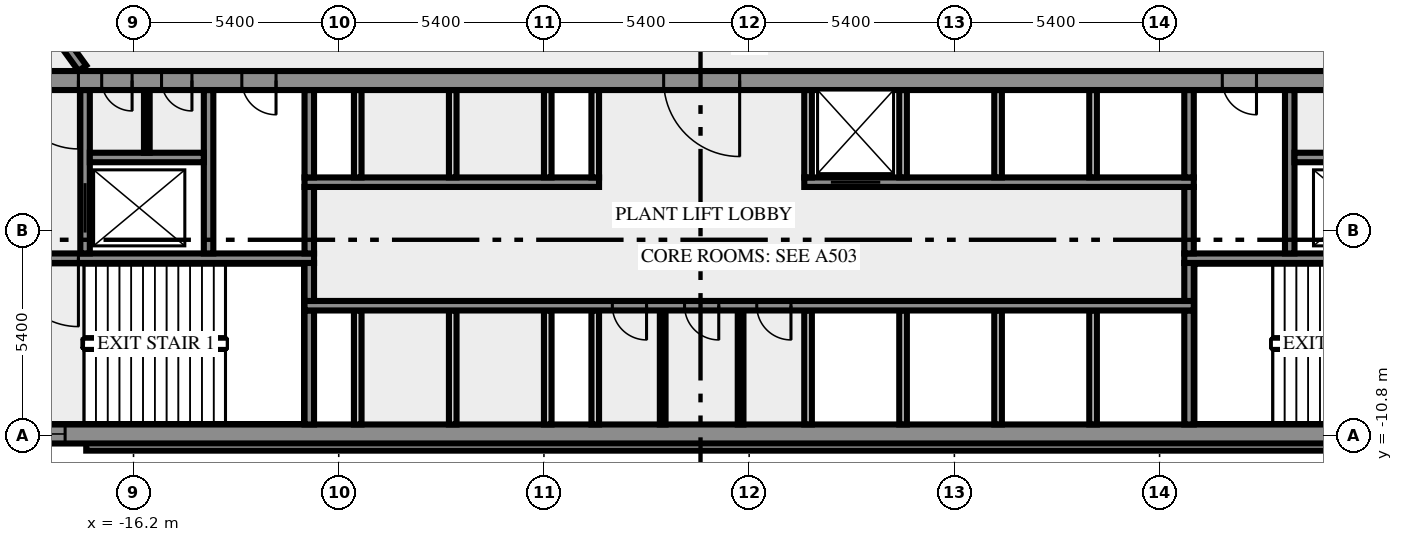
"""IFC4 building model, lengths in metres.
Left out: names, types, materials, properties, quantities, classifications, styles, units other than length and angle.
Written with IfcOpenShell. Run it as: python <this file> out.ifc"""

import sys

from ifc_helpers import new_model, si_unit, direction, frame, frame_2d, origin, place, context, subcontext, project, spatial, rectangle, extrude, element, fill, save


model = new_model("IFC4")
c1 = context("Model", 3, precision=1e-05, world=origin(), true_north=direction((0.0, 1.0)))
c2 = subcontext(c1, "Body", "Model", "MODEL_VIEW")
j1 = project(units=[si_unit("LENGTHUNIT", "METRE"), si_unit("PLANEANGLEUNIT", "RADIAN")], contexts=[c1])
p1 = place(None, origin())
s1 = spatial("IfcSite", under=j1, at=p1, CompositionType="ELEMENT")
p2 = place(p1, origin())
s2 = spatial("IfcBuilding", under=s1, at=p2, CompositionType="ELEMENT")
p3 = place(p2, frame((0.0, 0.0, 242.0)))
s3 = spatial("IfcBuildingStorey", under=s2, at=p3, CompositionType="ELEMENT", Elevation=242.0)
p4 = place(p3, frame((-17.444, -11.088, 0.0), z_axis=(0.0, 0.0, 1.0), x_axis=(1.0, 0.0, 0.0)))
e1 = element("IfcWall", 1, at=p4, inside=s3, PredefinedType="SOLIDWALL", context=c2, shape_type="SweptSolid", body=[
    extrude(rectangle(XDim=34.888, YDim=0.2, at=frame_2d((17.444, 0.0))), origin(), (0.0, 0.0, 1.0), 5.6),
])
p5 = place(p3, frame((-20.0, -10.75, 0.0), z_axis=(0.0, 0.0, 1.0), x_axis=(1.0, 0.0, 0.0)))
e2 = element("IfcWall", 2, at=p5, inside=s3, PredefinedType="SHEAR", context=c2, shape_type="SweptSolid", body=[
    extrude(rectangle(XDim=40.0, YDim=0.5, at=frame_2d((20.0, 0.0))), origin(), (0.0, 0.0, 1.0), 5.6),
])
p6 = place(p5, frame((0.8, 0.0, 1.0)))
e3 = element("IfcOpeningElement", 3, at=p6, cuts=e2, PredefinedType="OPENING", context=c2, shape_type="SweptSolid", body=[
    extrude(rectangle(XDim=1.2, YDim=1.2, at=frame_2d((0.6, 0.6))), frame((0.0, 0.26, 0.0), z_axis=(0.0, -1.0, 0.0), x_axis=(1.0, 0.0, 0.0)), (0.0, 0.0, 1.0), 0.52),
])
p7 = place(p5, frame((38.0, 0.0, 1.0)))
e4 = element("IfcOpeningElement", 4, at=p7, cuts=e2, PredefinedType="OPENING", context=c2, shape_type="SweptSolid", body=[
    extrude(rectangle(XDim=1.2, YDim=1.2, at=frame_2d((0.6, 0.6))), frame((0.0, 0.26, 0.0), z_axis=(0.0, -1.0, 0.0), x_axis=(1.0, 0.0, 0.0)), (0.0, 0.0, 1.0), 0.52),
])
p8 = place(p3, frame((-11.575, -10.5, 0.0), z_axis=(0.0, 0.0, 1.0), x_axis=(0.0, 1.0, 0.0)))
e5 = element("IfcWall", 5, at=p8, inside=s3, PredefinedType="SHEAR", context=c2, shape_type="SweptSolid", body=[
    extrude(rectangle(XDim=3.0, YDim=0.25, at=frame_2d((1.5, 0.0))), origin(), (0.0, 0.0, 1.0), 5.6),
])
for number, where, z_axis, x_axis in (
    (6, (-10.3, -10.5, 0.0), (0.0, 0.0, 1.0), (0.0, 1.0, 0.0)),
    (7, (-7.8, -10.5, 0.0), (0.0, 0.0, 1.0), (0.0, 1.0, 0.0)),
    (8, (-5.3, -10.5, 0.0), (0.0, 0.0, 1.0), (0.0, 1.0, 0.0)),
    (9, (-4.05, -10.5, 0.0), (0.0, 0.0, 1.0), (0.0, 1.0, 0.0)),
):
    element("IfcWall", number, at=place(p3, frame(where, z_axis=z_axis, x_axis=x_axis)), inside=s3, PredefinedType="SOLIDWALL", context=c2, shape_type="SweptSolid", body=[
        extrude(rectangle(XDim=3.0, YDim=0.2, at=frame_2d((1.5, 0.0))), origin(), (0.0, 0.0, 1.0), 5.6),
    ])
for number, where, z_axis, x_axis in (
    (10, (-2.275, -10.5, 0.0), (0.0, 0.0, 1.0), (0.0, 1.0, 0.0)),
    (11, (-0.225, -10.5, 0.0), (0.0, 0.0, 1.0), (0.0, 1.0, 0.0)),
):
    element("IfcWall", number, at=place(p3, frame(where, z_axis=z_axis, x_axis=x_axis)), inside=s3, PredefinedType="PARTITIONING", context=c2, shape_type="SweptSolid", body=[
        extrude(rectangle(XDim=3.0, YDim=0.15, at=frame_2d((1.5, 0.0))), origin(), (0.0, 0.0, 1.0), 5.6),
    ])
for number, where, z_axis, x_axis in (
    (12, (1.55, -10.5, 0.0), (0.0, 0.0, 1.0), (0.0, 1.0, 0.0)),
    (13, (4.05, -10.5, 0.0), (0.0, 0.0, 1.0), (0.0, 1.0, 0.0)),
    (14, (6.55, -10.5, 0.0), (0.0, 0.0, 1.0), (0.0, 1.0, 0.0)),
    (15, (9.05, -10.5, 0.0), (0.0, 0.0, 1.0), (0.0, 1.0, 0.0)),
):
    element("IfcWall", number, at=place(p3, frame(where, z_axis=z_axis, x_axis=x_axis)), inside=s3, PredefinedType="SOLIDWALL", context=c2, shape_type="SweptSolid", body=[
        extrude(rectangle(XDim=3.0, YDim=0.2, at=frame_2d((1.5, 0.0))), origin(), (0.0, 0.0, 1.0), 5.6),
    ])
p9 = place(p3, frame((11.575, -10.5, 0.0), z_axis=(0.0, 0.0, 1.0), x_axis=(0.0, 1.0, 0.0)))
e16 = element("IfcWall", 16, at=p9, inside=s3, PredefinedType="SHEAR", context=c2, shape_type="SweptSolid", body=[
    extrude(rectangle(XDim=3.0, YDim=0.25, at=frame_2d((1.5, 0.0))), origin(), (0.0, 0.0, 1.0), 5.6),
])
p10 = place(p3, frame((11.7, -7.375, 0.0), z_axis=(0.0, 0.0, 1.0), x_axis=(-1.0, 0.0, 0.0)))
e17 = element("IfcWall", 17, at=p10, inside=s3, PredefinedType="SHEAR", context=c2, shape_type="SweptSolid", body=[
    extrude(rectangle(XDim=23.4, YDim=0.25, at=frame_2d((11.7, 0.0))), origin(), (0.0, 0.0, 1.0), 5.6),
])
p11 = place(p10, frame((14.4, 0.0, 0.0)))
e18 = element("IfcOpeningElement", 18, at=p11, cuts=e17, PredefinedType="OPENING", context=c2, shape_type="SweptSolid", body=[
    extrude(rectangle(XDim=0.9, YDim=2.1, at=frame_2d((0.45, 1.05))), frame((0.0, 0.135, 0.0), z_axis=(0.0, -1.0, 0.0), x_axis=(1.0, 0.0, 0.0)), (0.0, 0.0, 1.0), 0.27),
])
p12 = place(p10, frame((12.5, 0.0, 0.0)))
e19 = element("IfcOpeningElement", 19, at=p12, cuts=e17, PredefinedType="OPENING", context=c2, shape_type="SweptSolid", body=[
    extrude(rectangle(XDim=0.9, YDim=2.1, at=frame_2d((0.45, 1.05))), frame((0.0, 0.135, 0.0), z_axis=(0.0, -1.0, 0.0), x_axis=(1.0, 0.0, 0.0)), (0.0, 0.0, 1.0), 0.27),
])
p13 = place(p10, frame((10.6, 0.0, 0.0)))
e20 = element("IfcOpeningElement", 20, at=p13, cuts=e17, PredefinedType="OPENING", context=c2, shape_type="SweptSolid", body=[
    extrude(rectangle(XDim=0.9, YDim=2.1, at=frame_2d((0.45, 1.05))), frame((0.0, 0.135, 0.0), z_axis=(0.0, -1.0, 0.0), x_axis=(1.0, 0.0, 0.0)), (0.0, 0.0, 1.0), 0.27),
])
for number, where, z_axis, x_axis in (
    (21, (-11.575, -7.25, 0.0), (0.0, 0.0, 1.0), (0.0, 1.0, 0.0)),
    (22, (11.575, -7.25, 0.0), (0.0, 0.0, 1.0), (0.0, 1.0, 0.0)),
):
    element("IfcWall", number, at=place(p3, frame(where, z_axis=z_axis, x_axis=x_axis)), inside=s3, PredefinedType="SHEAR", context=c2, shape_type="SweptSolid", body=[
        extrude(rectangle(XDim=1.0, YDim=0.25, at=frame_2d((0.5, 0.0))), origin(), (0.0, 0.0, 1.0), 5.6),
    ])
p14 = place(p3, frame((-11.45, -6.125, 0.0), z_axis=(0.0, 0.0, 1.0), x_axis=(-1.0, 0.0, 0.0)))
e23 = element("IfcWall", 23, at=p14, inside=s3, PredefinedType="SHEAR", context=c2, shape_type="SweptSolid", body=[
    extrude(rectangle(XDim=8.05, YDim=0.25, at=frame_2d((4.025, 0.0))), origin(), (0.0, 0.0, 1.0), 5.6),
])
p15 = place(p14, frame((6.2, 0.0, 0.0)))
e24 = element("IfcOpeningElement", 24, at=p15, cuts=e23, PredefinedType="OPENING", context=c2, shape_type="SweptSolid", body=[
    extrude(rectangle(XDim=1.8, YDim=2.1, at=frame_2d((0.9, 1.05))), frame((0.0, 0.135, 0.0), z_axis=(0.0, -1.0, 0.0), x_axis=(1.0, 0.0, 0.0)), (0.0, 0.0, 1.0), 0.27),
])
p16 = place(p3, frame((19.5, -6.125, 0.0), z_axis=(0.0, 0.0, 1.0), x_axis=(-1.0, 0.0, 0.0)))
e25 = element("IfcWall", 25, at=p16, inside=s3, PredefinedType="SHEAR", context=c2, shape_type="SweptSolid", body=[
    extrude(rectangle(XDim=8.05, YDim=0.25, at=frame_2d((4.025, 0.0))), origin(), (0.0, 0.0, 1.0), 5.6),
])
p17 = place(p16, frame((0.05, 0.0, 0.0)))
e26 = element("IfcOpeningElement", 26, at=p17, cuts=e25, PredefinedType="OPENING", context=c2, shape_type="SweptSolid", body=[
    extrude(rectangle(XDim=1.8, YDim=2.1, at=frame_2d((0.9, 1.05))), frame((0.0, 0.135, 0.0), z_axis=(0.0, -1.0, 0.0), x_axis=(1.0, 0.0, 0.0)), (0.0, 0.0, 1.0), 0.27),
])
p18 = place(p3, frame((-17.475, -6.0, 0.0), z_axis=(0.0, 0.0, 1.0), x_axis=(0.0, 1.0, 0.0)))
e27 = element("IfcWall", 27, at=p18, inside=s3, PredefinedType="SHEAR", context=c2, shape_type="SweptSolid", body=[
    extrude(rectangle(XDim=4.3, YDim=0.25, at=frame_2d((2.15, 0.0))), origin(), (0.0, 0.0, 1.0), 5.6),
])
p19 = place(p18, frame((0.55, 0.0, 0.0)))
e28 = element("IfcOpeningElement", 28, at=p19, cuts=e27, PredefinedType="OPENING", context=c2, shape_type="SweptSolid", body=[
    extrude(rectangle(XDim=1.3, YDim=2.1, at=frame_2d((0.65, 1.05))), frame((0.0, 0.135, 0.0), z_axis=(0.0, -1.0, 0.0), x_axis=(1.0, 0.0, 0.0)), (0.0, 0.0, 1.0), 0.27),
])
p20 = place(p3, frame((-14.225, -6.0, 0.0), z_axis=(0.0, 0.0, 1.0), x_axis=(0.0, 1.0, 0.0)))
e29 = element("IfcWall", 29, at=p20, inside=s3, PredefinedType="SHEAR", context=c2, shape_type="SweptSolid", body=[
    extrude(rectangle(XDim=4.3, YDim=0.25, at=frame_2d((2.15, 0.0))), origin(), (0.0, 0.0, 1.0), 5.6),
])
for number, where, z_axis, x_axis in (
    (30, (-11.575, -6.0, 0.0), (0.0, 0.0, 1.0), (0.0, 1.0, 0.0)),
    (31, (11.575, -6.0, 0.0), (0.0, 0.0, 1.0), (0.0, 1.0, 0.0)),
):
    element("IfcWall", number, at=place(p3, frame(where, z_axis=z_axis, x_axis=x_axis)), inside=s3, PredefinedType="SHEAR", context=c2, shape_type="SweptSolid", body=[
        extrude(rectangle(XDim=1.75, YDim=0.25, at=frame_2d((0.875, 0.0))), origin(), (0.0, 0.0, 1.0), 5.6),
    ])
p21 = place(p3, frame((14.225, -6.0, 0.0), z_axis=(0.0, 0.0, 1.0), x_axis=(0.0, 1.0, 0.0)))
e32 = element("IfcWall", 32, at=p21, inside=s3, PredefinedType="SHEAR", context=c2, shape_type="SweptSolid", body=[
    extrude(rectangle(XDim=4.3, YDim=0.25, at=frame_2d((2.15, 0.0))), origin(), (0.0, 0.0, 1.0), 5.6),
])
p22 = place(p3, frame((-11.7, -4.125, 0.0), z_axis=(0.0, 0.0, 1.0), x_axis=(1.0, 0.0, 0.0)))
e33 = element("IfcWall", 33, at=p22, inside=s3, PredefinedType="SHEAR", context=c2, shape_type="SweptSolid", body=[
    extrude(rectangle(XDim=7.75, YDim=0.25, at=frame_2d((3.875, 0.0))), origin(), (0.0, 0.0, 1.0), 5.6),
])
p23 = place(p3, frame((1.45, -4.125, 0.0), z_axis=(0.0, 0.0, 1.0), x_axis=(1.0, 0.0, 0.0)))
e34 = element("IfcWall", 34, at=p23, inside=s3, PredefinedType="SHEAR", context=c2, shape_type="SweptSolid", body=[
    extrude(rectangle(XDim=10.25, YDim=0.25, at=frame_2d((5.125, 0.0))), origin(), (0.0, 0.0, 1.0), 5.6),
])
p24 = place(p23, frame((0.7, 0.0, 0.0)))
e35 = element("IfcOpeningElement", 35, at=p24, cuts=e34, PredefinedType="OPENING", context=c2, shape_type="SweptSolid", body=[
    extrude(rectangle(XDim=1.3, YDim=2.1, at=frame_2d((0.65, 1.05))), frame((0.0, 0.135, 0.0), z_axis=(0.0, -1.0, 0.0), x_axis=(1.0, 0.0, 0.0)), (0.0, 0.0, 1.0), 0.27),
])
p25 = place(p3, frame((-11.575, -4.0, 0.0), z_axis=(0.0, 0.0, 1.0), x_axis=(0.0, 1.0, 0.0)))
e36 = element("IfcWall", 36, at=p25, inside=s3, PredefinedType="SHEAR", context=c2, shape_type="SweptSolid", body=[
    extrude(rectangle(XDim=2.3, YDim=0.25, at=frame_2d((1.15, 0.0))), origin(), (0.0, 0.0, 1.0), 5.6),
])
for number, where, z_axis, x_axis in (
    (37, (-10.3, -4.0, 0.0), (0.0, 0.0, 1.0), (0.0, 1.0, 0.0)),
    (38, (-7.8, -4.0, 0.0), (0.0, 0.0, 1.0), (0.0, 1.0, 0.0)),
    (39, (-5.3, -4.0, 0.0), (0.0, 0.0, 1.0), (0.0, 1.0, 0.0)),
    (40, (-4.05, -4.0, 0.0), (0.0, 0.0, 1.0), (0.0, 1.0, 0.0)),
    (41, (1.55, -4.0, 0.0), (0.0, 0.0, 1.0), (0.0, 1.0, 0.0)),
    (42, (4.05, -4.0, 0.0), (0.0, 0.0, 1.0), (0.0, 1.0, 0.0)),
    (43, (6.55, -4.0, 0.0), (0.0, 0.0, 1.0), (0.0, 1.0, 0.0)),
    (44, (9.05, -4.0, 0.0), (0.0, 0.0, 1.0), (0.0, 1.0, 0.0)),
):
    element("IfcWall", number, at=place(p3, frame(where, z_axis=z_axis, x_axis=x_axis)), inside=s3, PredefinedType="SOLIDWALL", context=c2, shape_type="SweptSolid", body=[
        extrude(rectangle(XDim=2.3, YDim=0.2, at=frame_2d((1.15, 0.0))), origin(), (0.0, 0.0, 1.0), 5.6),
    ])
p26 = place(p3, frame((11.575, -4.0, 0.0), z_axis=(0.0, 0.0, 1.0), x_axis=(0.0, 1.0, 0.0)))
e45 = element("IfcWall", 45, at=p26, inside=s3, PredefinedType="SHEAR", context=c2, shape_type="SweptSolid", body=[
    extrude(rectangle(XDim=2.3, YDim=0.25, at=frame_2d((1.15, 0.0))), origin(), (0.0, 0.0, 1.0), 5.6),
])
for number, where, z_axis, x_axis in (
    (46, (-17.35, -3.475, 0.0), (0.0, 0.0, 1.0), (1.0, 0.0, 0.0)),
    (47, (14.35, -3.475, 0.0), (0.0, 0.0, 1.0), (1.0, 0.0, 0.0)),
):
    element("IfcWall", number, at=place(p3, frame(where, z_axis=z_axis, x_axis=x_axis)), inside=s3, PredefinedType="SHEAR", context=c2, shape_type="SweptSolid", body=[
        extrude(rectangle(XDim=3.0, YDim=0.25, at=frame_2d((1.5, 0.0))), origin(), (0.0, 0.0, 1.0), 5.6),
    ])
p27 = place(p3, frame((-15.85, -3.35, 0.0), z_axis=(0.0, 0.0, 1.0), x_axis=(0.0, 1.0, 0.0)))
e48 = element("IfcWall", 48, at=p27, inside=s3, PredefinedType="PARTITIONING", context=c2, shape_type="SweptSolid", body=[
    extrude(rectangle(XDim=1.65, YDim=0.15, at=frame_2d((0.825, 0.0))), origin(), (0.0, 0.0, 1.0), 5.6),
])
p28 = place(p3, frame((20.49, -1.45, 0.0), z_axis=(0.0, 0.0, 1.0), x_axis=(-1.0, 0.0, 0.0)))
e49 = element("IfcWall", 49, at=p28, inside=s3, PredefinedType="SHEAR", context=c2, shape_type="SweptSolid", body=[
    extrude(rectangle(XDim=40.98, YDim=0.5, at=frame_2d((20.49, 0.0))), origin(), (0.0, 0.0, 1.0), 5.6),
])
p29 = place(p28, frame((38.14, 0.0, 0.0)))
e50 = element("IfcOpeningElement", 50, at=p29, cuts=e49, PredefinedType="OPENING", context=c2, shape_type="SweptSolid", body=[
    extrude(rectangle(XDim=1.8, YDim=2.1, at=frame_2d((0.9, 1.05))), frame((0.0, 0.26, 0.0), z_axis=(0.0, -1.0, 0.0), x_axis=(1.0, 0.0, 0.0)), (0.0, 0.0, 1.0), 0.52),
])
p30 = place(p28, frame((36.728, 0.0, 0.0)))
e51 = element("IfcOpeningElement", 51, at=p30, cuts=e49, PredefinedType="OPENING", context=c2, shape_type="SweptSolid", body=[
    extrude(rectangle(XDim=0.8, YDim=2.1, at=frame_2d((0.4, 1.05))), frame((0.0, 0.26, 0.0), z_axis=(0.0, -1.0, 0.0), x_axis=(1.0, 0.0, 0.0)), (0.0, 0.0, 1.0), 0.52),
])
p31 = place(p28, frame((35.153, 0.0, 0.0)))
e52 = element("IfcOpeningElement", 52, at=p31, cuts=e49, PredefinedType="OPENING", context=c2, shape_type="SweptSolid", body=[
    extrude(rectangle(XDim=0.8, YDim=2.1, at=frame_2d((0.4, 1.05))), frame((0.0, 0.26, 0.0), z_axis=(0.0, -1.0, 0.0), x_axis=(1.0, 0.0, 0.0)), (0.0, 0.0, 1.0), 0.52),
])
p32 = place(p28, frame((32.94, 0.0, 0.0)))
e53 = element("IfcOpeningElement", 53, at=p32, cuts=e49, PredefinedType="OPENING", context=c2, shape_type="SweptSolid", body=[
    extrude(rectangle(XDim=0.9, YDim=2.1, at=frame_2d((0.45, 1.05))), frame((0.0, 0.26, 0.0), z_axis=(0.0, -1.0, 0.0), x_axis=(1.0, 0.0, 0.0)), (0.0, 0.0, 1.0), 0.52),
])
p33 = place(p28, frame((20.74, 0.0, 0.0)))
e54 = element("IfcOpeningElement", 54, at=p33, cuts=e49, PredefinedType="OPENING", context=c2, shape_type="SweptSolid", body=[
    extrude(rectangle(XDim=2.0, YDim=2.1, at=frame_2d((1.0, 1.05))), frame((0.0, 0.26, 0.0), z_axis=(0.0, -1.0, 0.0), x_axis=(1.0, 0.0, 0.0)), (0.0, 0.0, 1.0), 0.52),
])
p34 = place(p28, frame((7.14, 0.0, 0.0)))
e55 = element("IfcOpeningElement", 55, at=p34, cuts=e49, PredefinedType="OPENING", context=c2, shape_type="SweptSolid", body=[
    extrude(rectangle(XDim=0.9, YDim=2.1, at=frame_2d((0.45, 1.05))), frame((0.0, 0.26, 0.0), z_axis=(0.0, -1.0, 0.0), x_axis=(1.0, 0.0, 0.0)), (0.0, 0.0, 1.0), 0.52),
])
p35 = place(p28, frame((4.19, 0.0, 0.0)))
e56 = element("IfcOpeningElement", 56, at=p35, cuts=e49, PredefinedType="OPENING", context=c2, shape_type="SweptSolid", body=[
    extrude(rectangle(XDim=0.9, YDim=2.1, at=frame_2d((0.45, 1.05))), frame((0.0, 0.26, 0.0), z_axis=(0.0, -1.0, 0.0), x_axis=(1.0, 0.0, 0.0)), (0.0, 0.0, 1.0), 0.52),
])
p36 = place(p28, frame((1.04, 0.0, 0.0)))
e57 = element("IfcOpeningElement", 57, at=p36, cuts=e49, PredefinedType="OPENING", context=c2, shape_type="SweptSolid", body=[
    extrude(rectangle(XDim=1.8, YDim=2.1, at=frame_2d((0.9, 1.05))), frame((0.0, 0.26, 0.0), z_axis=(0.0, -1.0, 0.0), x_axis=(1.0, 0.0, 0.0)), (0.0, 0.0, 1.0), 0.52),
])
p37 = place(p3, frame((-31.387, 17.927, 0.0), z_axis=(0.0, 0.0, 1.0), x_axis=(0.587788830132, -0.80901439491, 0.0)))
e58 = element("IfcWall", 58, at=p37, inside=s3, PredefinedType="SOLIDWALL", context=c2, shape_type="SweptSolid", body=[
    extrude(rectangle(XDim=23.549, YDim=0.25, at=frame_2d((11.775, 0.0))), origin(), (0.0, 0.0, 1.0), 5.6),
])
p38 = place(p37, frame((18.907, 0.0, 0.0)))
e59 = element("IfcOpeningElement", 59, at=p38, cuts=e58, PredefinedType="OPENING", context=c2, shape_type="SweptSolid", body=[
    extrude(rectangle(XDim=1.2, YDim=2.1, at=frame_2d((0.6, 1.05))), frame((0.0, 0.135, 0.0), z_axis=(0.0, -1.0, 0.0), x_axis=(1.0, 0.0, 0.0)), (0.0, 0.0, 1.0), 0.27),
])
p39 = place(p6, origin())
e60 = element("IfcWindow", 60, at=p39, inside=s3, PartitioningType="SINGLE_PANEL", PredefinedType="WINDOW", context=c2, shape_type="SweptSolid", body=[
    extrude(rectangle(XDim=1.2, YDim=1.2, at=frame_2d((0.6, 0.6))), frame((0.0, 0.03, 0.0), z_axis=(0.0, -1.0, 0.0), x_axis=(1.0, 0.0, 0.0)), (0.0, 0.0, 1.0), 0.06),
])
fill(e3, e60)
p40 = place(p11, origin())
e61 = element("IfcDoor", 61, at=p40, inside=s3, OperationType="SINGLE_SWING_RIGHT", PredefinedType="DOOR", context=c2, shape_type="SweptSolid", body=[
    extrude(rectangle(XDim=0.9, YDim=2.1, at=frame_2d((0.45, 1.05))), frame((0.0, 0.025, 0.0), z_axis=(0.0, -1.0, 0.0), x_axis=(1.0, 0.0, 0.0)), (0.0, 0.0, 1.0), 0.05),
])
fill(e18, e61)
p41 = place(p12, origin())
e62 = element("IfcDoor", 62, at=p41, inside=s3, OperationType="SINGLE_SWING_RIGHT", PredefinedType="DOOR", context=c2, shape_type="SweptSolid", body=[
    extrude(rectangle(XDim=0.9, YDim=2.1, at=frame_2d((0.45, 1.05))), frame((0.0, 0.025, 0.0), z_axis=(0.0, -1.0, 0.0), x_axis=(1.0, 0.0, 0.0)), (0.0, 0.0, 1.0), 0.05),
])
fill(e19, e62)
p42 = place(p13, origin())
e63 = element("IfcDoor", 63, at=p42, inside=s3, OperationType="SINGLE_SWING_LEFT", PredefinedType="DOOR", context=c2, shape_type="SweptSolid", body=[
    extrude(rectangle(XDim=0.9, YDim=2.1, at=frame_2d((0.45, 1.05))), frame((0.0, 0.025, 0.0), z_axis=(0.0, -1.0, 0.0), x_axis=(1.0, 0.0, 0.0)), (0.0, 0.0, 1.0), 0.05),
])
fill(e20, e63)
p43 = place(p15, origin())
e64 = element("IfcDoor", 64, at=p43, inside=s3, OperationType="DOUBLE_DOOR_SINGLE_SWING", PredefinedType="DOOR", context=c2, shape_type="SweptSolid", body=[
    extrude(rectangle(XDim=1.8, YDim=2.1, at=frame_2d((0.9, 1.05))), frame((0.0, 0.025, 0.0), z_axis=(0.0, -1.0, 0.0), x_axis=(1.0, 0.0, 0.0)), (0.0, 0.0, 1.0), 0.05),
])
fill(e24, e64)
p44 = place(p19, origin())
e65 = element("IfcDoor", 65, at=p44, inside=s3, OperationType="DOUBLE_DOOR_SLIDING", PredefinedType="DOOR", context=c2, shape_type="SweptSolid", body=[
    extrude(rectangle(XDim=1.3, YDim=2.1, at=frame_2d((0.65, 1.05))), frame((0.0, 0.025, 0.0), z_axis=(0.0, -1.0, 0.0), x_axis=(1.0, 0.0, 0.0)), (0.0, 0.0, 1.0), 0.05),
])
fill(e28, e65)
p45 = place(p24, origin())
e66 = element("IfcDoor", 66, at=p45, inside=s3, OperationType="DOUBLE_DOOR_SLIDING", PredefinedType="DOOR", context=c2, shape_type="SweptSolid", body=[
    extrude(rectangle(XDim=1.3, YDim=2.1, at=frame_2d((0.65, 1.05))), frame((0.0, 0.025, 0.0), z_axis=(0.0, -1.0, 0.0), x_axis=(1.0, 0.0, 0.0)), (0.0, 0.0, 1.0), 0.05),
])
fill(e35, e66)
p46 = place(p29, origin())
e67 = element("IfcDoor", 67, at=p46, inside=s3, OperationType="DOUBLE_DOOR_SINGLE_SWING", PredefinedType="DOOR", context=c2, shape_type="SweptSolid", body=[
    extrude(rectangle(XDim=1.8, YDim=2.1, at=frame_2d((0.9, 1.05))), frame((0.0, 0.025, 0.0), z_axis=(0.0, -1.0, 0.0), x_axis=(1.0, 0.0, 0.0)), (0.0, 0.0, 1.0), 0.05),
])
fill(e50, e67)
p47 = place(p30, origin())
e68 = element("IfcDoor", 68, at=p47, inside=s3, OperationType="SINGLE_SWING_RIGHT", PredefinedType="DOOR", context=c2, shape_type="SweptSolid", body=[
    extrude(rectangle(XDim=0.8, YDim=2.1, at=frame_2d((0.4, 1.05))), frame((0.0, 0.025, 0.0), z_axis=(0.0, -1.0, 0.0), x_axis=(1.0, 0.0, 0.0)), (0.0, 0.0, 1.0), 0.05),
])
fill(e51, e68)
p48 = place(p31, origin())
e69 = element("IfcDoor", 69, at=p48, inside=s3, OperationType="SINGLE_SWING_RIGHT", PredefinedType="DOOR", context=c2, shape_type="SweptSolid", body=[
    extrude(rectangle(XDim=0.8, YDim=2.1, at=frame_2d((0.4, 1.05))), frame((0.0, 0.025, 0.0), z_axis=(0.0, -1.0, 0.0), x_axis=(1.0, 0.0, 0.0)), (0.0, 0.0, 1.0), 0.05),
])
fill(e52, e69)
p49 = place(p32, origin())
e70 = element("IfcDoor", 70, at=p49, inside=s3, OperationType="SINGLE_SWING_RIGHT", PredefinedType="DOOR", context=c2, shape_type="SweptSolid", body=[
    extrude(rectangle(XDim=0.9, YDim=2.1, at=frame_2d((0.45, 1.05))), frame((0.0, 0.025, 0.0), z_axis=(0.0, -1.0, 0.0), x_axis=(1.0, 0.0, 0.0)), (0.0, 0.0, 1.0), 0.05),
])
fill(e53, e70)
p50 = place(p33, origin())
e71 = element("IfcDoor", 71, at=p50, inside=s3, OperationType="DOUBLE_DOOR_SINGLE_SWING", PredefinedType="DOOR", context=c2, shape_type="SweptSolid", body=[
    extrude(rectangle(XDim=2.0, YDim=2.1, at=frame_2d((1.0, 1.05))), frame((0.0, 0.025, 0.0), z_axis=(0.0, -1.0, 0.0), x_axis=(1.0, 0.0, 0.0)), (0.0, 0.0, 1.0), 0.05),
])
fill(e54, e71)
p51 = place(p34, origin())
e72 = element("IfcDoor", 72, at=p51, inside=s3, OperationType="SINGLE_SWING_LEFT", PredefinedType="DOOR", context=c2, shape_type="SweptSolid", body=[
    extrude(rectangle(XDim=0.9, YDim=2.1, at=frame_2d((0.45, 1.05))), frame((0.0, 0.025, 0.0), z_axis=(0.0, -1.0, 0.0), x_axis=(1.0, 0.0, 0.0)), (0.0, 0.0, 1.0), 0.05),
])
fill(e55, e72)
save(model, sys.argv[1])
